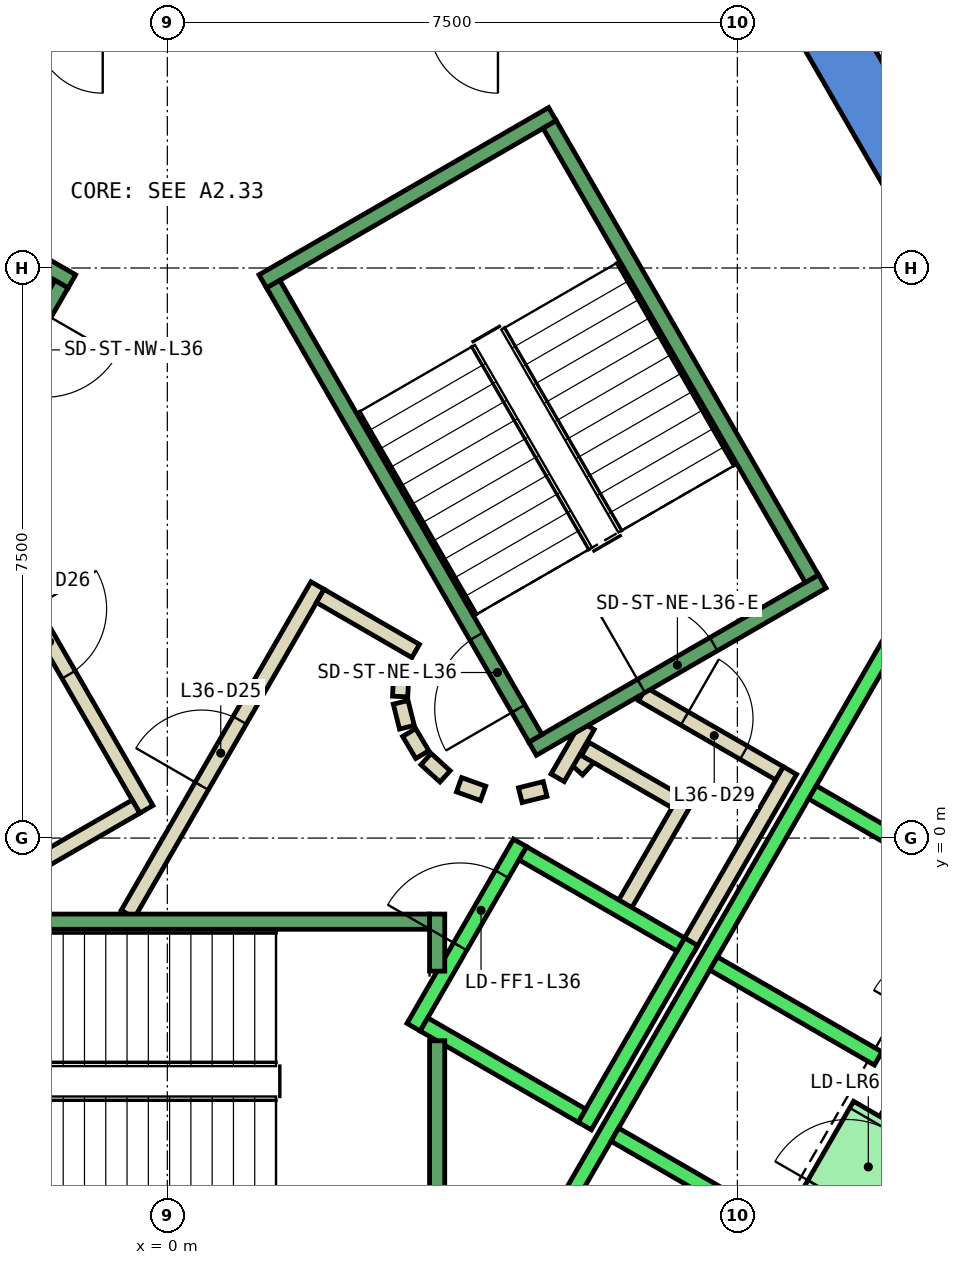
"""IFC4 building model, lengths in metres.
Left out: names, types, materials, properties, quantities, classifications, styles, units other than length and angle.
Written with IfcOpenShell. Run it as: python <this file> out.ifc"""

import sys

from ifc_helpers import new_model, si_unit, direction, frame, frame_2d, origin, place, context, subcontext, project, spatial, polyline, rectangle, outline, extrude, element, fill, save


model = new_model("IFC4")
c1 = context("Model", 3, precision=1e-05, world=origin(), true_north=direction((0.0, 1.0)))
c2 = subcontext(c1, "Body", "Model", "MODEL_VIEW")
j1 = project(units=[si_unit("LENGTHUNIT", "METRE"), si_unit("PLANEANGLEUNIT", "RADIAN")], contexts=[c1])
p1 = place(None, origin())
s1 = spatial("IfcSite", under=j1, at=p1, CompositionType="ELEMENT")
p2 = place(p1, origin())
s2 = spatial("IfcBuilding", under=s1, at=p2, CompositionType="ELEMENT")
p3 = place(p2, frame((0.0, 0.0, 163.4)))
s3 = spatial("IfcBuildingStorey", under=s2, at=p3, CompositionType="ELEMENT", Elevation=163.4)
p4 = place(p3, frame((0.0, 0.0, -0.4)))
e1 = element("IfcWall", 1, at=p4, inside=s3, PredefinedType="SHEAR", context=c2, shape_type="SweptSolid", body=[
    extrude(outline(polyline([(8.517, 11.748), (7.824, 11.348), (12.933, 2.5), (13.856, 2.5), (8.517, 11.748)])), origin(), (0.0, 0.0, 1.0), 4.2),
])
p5 = place(p3, frame((0.0, 0.0, -0.4)))
e2 = element("IfcWall", 2, at=p5, inside=s3, PredefinedType="SHEAR", context=c2, shape_type="SweptSolid", body=[
    extrude(outline(polyline([(10.717, -2.937), (10.025, -2.537), (9.374, -3.663), (10.067, -4.063), (10.717, -2.937)])), origin(), (0.0, 0.0, 1.0), 4.2),
])
p6 = place(p3, frame((0.0, 0.0, 3.6)))
e3 = element("IfcWall", 3, at=p6, inside=s3, PredefinedType="SHEAR", context=c2, shape_type="SweptSolid", body=[
    extrude(outline(polyline([(10.067, -4.063), (9.374, -3.663), (8.724, -4.789), (9.417, -5.189), (10.067, -4.063)])), origin(), (0.0, 0.0, 1.0), 0.2),
])
p7 = place(p3, frame((5.39, 0.898, 0.0), z_axis=(0.0, 0.0, 1.0), x_axis=(0.673828488714, 0.738887791073, 0.0)))
e4 = element("IfcWall", 4, at=p7, inside=s3, PredefinedType="PARTITIONING", context=c2, shape_type="SweptSolid", body=[
    extrude(rectangle(XDim=0.263, YDim=0.2, at=frame_2d((0.131, 0.0))), origin(), (0.0, 0.0, 1.0), 3.8),
])
p8 = place(p3, frame((5.499, 1.172, 0.0), z_axis=(0.0, 0.0, 1.0), x_axis=(0.866333505267, -0.499465972466, 0.0)))
e5 = element("IfcWall", 5, at=p8, inside=s3, PredefinedType="PARTITIONING", context=c2, shape_type="SweptSolid", body=[
    extrude(rectangle(XDim=1.374, YDim=0.2, at=frame_2d((0.687, 0.0))), origin(), (0.0, 0.0, 1.0), 3.8),
])
p9 = place(p3, frame((6.826, 0.522, 0.0), z_axis=(0.0, 0.0, 1.0), x_axis=(-0.500016722714, -0.866015748706, 0.0)))
e6 = element("IfcWall", 6, at=p9, inside=s3, PredefinedType="PARTITIONING", context=c2, shape_type="SweptSolid", body=[
    extrude(rectangle(XDim=1.7, YDim=0.2, at=frame_2d((0.85, 0.0))), origin(), (0.0, 0.0, 1.0), 3.8),
])
p10 = place(p3, frame((6.25, 1.894, 0.0), z_axis=(0.0, 0.0, 1.0), x_axis=(0.866043184279, -0.499969202016, 0.0)))
e7 = element("IfcWall", 7, at=p10, inside=s3, PredefinedType="PARTITIONING", context=c2, shape_type="SweptSolid", body=[
    extrude(rectangle(XDim=2.084, YDim=0.2, at=frame_2d((1.042, 0.0))), origin(), (0.0, 0.0, 1.0), 3.8),
])
p11 = place(p10, frame((0.642, 0.0, 0.0)))
e8 = element("IfcOpeningElement", 8, at=p11, cuts=e7, PredefinedType="OPENING", context=c2, shape_type="SweptSolid", body=[
    extrude(rectangle(XDim=0.9, YDim=2.1, at=frame_2d((0.45, 1.05))), frame((0.0, 0.11, 0.0), z_axis=(0.0, -1.0, 0.0), x_axis=(1.0, 0.0, 0.0)), (0.0, 0.0, 1.0), 0.22),
])
p12 = place(p3, frame((8.192, 0.888, 0.0), z_axis=(0.0, 0.0, 1.0), x_axis=(-0.499940625693, -0.866059680843, 0.0)))
e9 = element("IfcWall", 9, at=p12, inside=s3, PredefinedType="PARTITIONING", context=c2, shape_type="SweptSolid", body=[
    extrude(rectangle(XDim=2.68, YDim=0.2, at=frame_2d((1.34, 0.0))), origin(), (0.0, 0.0, 1.0), 3.8),
])
p13 = place(p3, frame((5.135, 0.793, 0.0), z_axis=(0.0, 0.0, 1.0), x_axis=(0.499526442893, 0.866298639529, 0.0)))
e10 = element("IfcWall", 10, at=p13, inside=s3, PredefinedType="PARTITIONING", context=c2, shape_type="SweptSolid", body=[
    extrude(rectangle(XDim=0.791, YDim=0.2, at=frame_2d((0.396, 0.0))), origin(), (0.0, 0.0, 1.0), 3.8),
])
p14 = place(p3, frame((-0.52, -1.0, 0.0), z_axis=(0.0, 0.0, 1.0), x_axis=(0.50011622646, 0.865958290007, 0.0)))
e11 = element("IfcWall", 11, at=p14, inside=s3, PredefinedType="PARTITIONING", context=c2, shape_type="SweptSolid", body=[
    extrude(rectangle(XDim=4.991, YDim=0.2, at=frame_2d((2.496, 0.0))), origin(), (0.0, 0.0, 1.0), 3.8),
])
p15 = place(p14, frame((1.945, 0.0, 0.0)))
e12 = element("IfcOpeningElement", 12, at=p15, cuts=e11, PredefinedType="OPENING", context=c2, shape_type="SweptSolid", body=[
    extrude(rectangle(XDim=1.0, YDim=2.1, at=frame_2d((0.5, 1.05))), frame((0.0, 0.11, 0.0), z_axis=(0.0, -1.0, 0.0), x_axis=(1.0, 0.0, 0.0)), (0.0, 0.0, 1.0), 0.22),
])
p16 = place(p3, frame((2.012, 3.186, 0.0), z_axis=(0.0, 0.0, 1.0), x_axis=(0.865891012941, -0.500232699559, 0.0)))
e13 = element("IfcWall", 13, at=p16, inside=s3, PredefinedType="PARTITIONING", context=c2, shape_type="SweptSolid", body=[
    extrude(rectangle(XDim=1.449, YDim=0.2, at=frame_2d((0.725, 0.0))), origin(), (0.0, 0.0, 1.0), 3.8),
])
p17 = place(p3, frame((3.079, 2.199, 0.0), z_axis=(0.0, 0.0, 1.0), x_axis=(-0.047771483479, -0.998858290933, 0.0)))
e14 = element("IfcWall", 14, at=p17, inside=s3, PredefinedType="PARTITIONING", context=c2, shape_type="SweptSolid", body=[
    extrude(rectangle(XDim=0.337, YDim=0.2, at=frame_2d((0.169, 0.0))), origin(), (0.0, 0.0, 1.0), 3.8),
])
p18 = place(p3, frame((3.07, 1.786, 0.0), z_axis=(0.0, 0.0, 1.0), x_axis=(0.242705583207, -0.970099994784, 0.0)))
e15 = element("IfcWall", 15, at=p18, inside=s3, PredefinedType="PARTITIONING", context=c2, shape_type="SweptSolid", body=[
    extrude(rectangle(XDim=0.338, YDim=0.2, at=frame_2d((0.169, 0.0))), origin(), (0.0, 0.0, 1.0), 3.8),
])
for number, where, z_axis, x_axis in (
    (16, (3.182, 1.388, 0.0), (0.0, 0.0, 1.0), (0.512, -0.859, 0.0)),
    (17, (3.404, 1.039, 0.0), (0.0, 0.0, 1.0), (0.74, -0.672, 0.0)),
):
    element("IfcWall", number, at=place(p3, frame(where, z_axis=z_axis, x_axis=x_axis)), inside=s3, PredefinedType="PARTITIONING", context=c2, shape_type="SweptSolid", body=[
        extrude(rectangle(XDim=0.338, YDim=0.2, at=frame_2d((0.169, 0.0))), origin(), (0.0, 0.0, 1.0), 3.8),
    ])
p19 = place(p3, frame((3.838, 0.702, 0.0), z_axis=(0.0, 0.0, 1.0), x_axis=(0.941035081519, -0.338308993895, 0.0)))
e18 = element("IfcWall", 18, at=p19, inside=s3, PredefinedType="PARTITIONING", context=c2, shape_type="SweptSolid", body=[
    extrude(rectangle(XDim=0.337, YDim=0.2, at=frame_2d((0.168, 0.0))), origin(), (0.0, 0.0, 1.0), 3.8),
])
p20 = place(p3, frame((4.644, 0.564, 0.0), z_axis=(0.0, 0.0, 1.0), x_axis=(0.969929076366, 0.243387729394, 0.0)))
e19 = element("IfcWall", 19, at=p20, inside=s3, PredefinedType="PARTITIONING", context=c2, shape_type="SweptSolid", body=[
    extrude(rectangle(XDim=0.337, YDim=0.2, at=frame_2d((0.168, 0.0))), origin(), (0.0, 0.0, 1.0), 3.8),
])
p21 = place(p3, frame((-2.771, 4.7, 0.0), z_axis=(0.0, 0.0, 1.0), x_axis=(0.499969479948, -0.866043023828, 0.0)))
e20 = element("IfcWall", 20, at=p21, inside=s3, PredefinedType="PARTITIONING", context=c2, shape_type="SweptSolid", body=[
    extrude(rectangle(XDim=4.99, YDim=0.2, at=frame_2d((2.495, 0.0))), origin(), (0.0, 0.0, 1.0), 3.8),
])
p22 = place(p21, frame((1.945, 0.0, 0.0)))
e21 = element("IfcOpeningElement", 21, at=p22, cuts=e20, PredefinedType="OPENING", context=c2, shape_type="SweptSolid", body=[
    extrude(rectangle(XDim=1.0, YDim=2.1, at=frame_2d((0.5, 1.05))), frame((0.0, 0.11, 0.0), z_axis=(0.0, -1.0, 0.0), x_axis=(1.0, 0.0, 0.0)), (0.0, 0.0, 1.0), 0.22),
])
p23 = place(p3, frame((-0.412, 0.414, 0.0), z_axis=(0.0, 0.0, 1.0), x_axis=(-0.866017369001, -0.500013916395, 0.0)))
e22 = element("IfcWall", 22, at=p23, inside=s3, PredefinedType="PARTITIONING", context=c2, shape_type="SweptSolid", body=[
    extrude(rectangle(XDim=1.45, YDim=0.2, at=frame_2d((0.725, 0.0))), origin(), (0.0, 0.0, 1.0), 3.8),
])
p24 = place(p3, frame((3.24, -2.488, 0.0), z_axis=(0.0, 0.0, 1.0), x_axis=(0.49994636267, 0.866056369097, 0.0)))
e23 = element("IfcWall", 23, at=p24, inside=s3, PredefinedType="STANDARD", context=c2, shape_type="SweptSolid", body=[
    extrude(rectangle(XDim=2.8, YDim=0.2, at=frame_2d((1.4, 0.0))), origin(), (0.0, 0.0, 1.0), 3.8),
])
p25 = place(p24, frame((1.225, 0.0, 0.0)))
e24 = element("IfcOpeningElement", 24, at=p25, cuts=e23, PredefinedType="OPENING", context=c2, shape_type="SweptSolid", body=[
    extrude(rectangle(XDim=1.1, YDim=2.1, at=frame_2d((0.55, 1.05))), frame((0.0, 0.11, 0.0), z_axis=(0.0, -1.0, 0.0), x_axis=(1.0, 0.0, 0.0)), (0.0, 0.0, 1.0), 0.22),
])
p26 = place(p3, frame((5.492, -3.788, 0.0), z_axis=(0.0, 0.0, 1.0), x_axis=(0.500011755427, 0.866018616679, 0.0)))
e25 = element("IfcWall", 25, at=p26, inside=s3, PredefinedType="STANDARD", context=c2, shape_type="SweptSolid", body=[
    extrude(rectangle(XDim=2.8, YDim=0.2, at=frame_2d((1.4, 0.0))), origin(), (0.0, 0.0, 1.0), 3.8),
])
p27 = place(p3, frame((3.377, -2.452, 0.0), z_axis=(0.0, 0.0, 1.0), x_axis=(0.865955154139, -0.50012165622, 0.0)))
e26 = element("IfcWall", 26, at=p27, inside=s3, PredefinedType="STANDARD", context=c2, shape_type="SweptSolid", body=[
    extrude(rectangle(XDim=2.4, YDim=0.2, at=frame_2d((1.2, 0.0))), origin(), (0.0, 0.0, 1.0), 3.8),
])
p28 = place(p3, frame((4.677, -0.2, 0.0), z_axis=(0.0, 0.0, 1.0), x_axis=(0.865973769406, -0.500089422704, 0.0)))
e27 = element("IfcWall", 27, at=p28, inside=s3, PredefinedType="STANDARD", context=c2, shape_type="SweptSolid", body=[
    extrude(rectangle(XDim=2.399, YDim=0.2, at=frame_2d((1.2, 0.0))), origin(), (0.0, 0.0, 1.0), 3.8),
])
p29 = place(p3, frame((4.451, -6.19, 0.0), z_axis=(0.0, 0.0, 1.0), x_axis=(0.50000090737, 0.866024879913, 0.0)))
e28 = element("IfcWall", 28, at=p29, inside=s3, PredefinedType="STANDARD", context=c2, shape_type="SweptSolid", body=[
    extrude(rectangle(XDim=10.6, YDim=0.2, at=frame_2d((5.3, 0.0))), origin(), (0.0, 0.0, 1.0), 3.8),
])
for number, where, z_axis, x_axis in (
    (29, (5.888, -3.902, 0.0), (0.0, 0.0, 1.0), (0.866, -0.5, 0.0)),
    (30, (7.188, -1.65, 0.0), (0.0, 0.0, 1.0), (0.866, -0.5, 0.0)),
    (31, (8.488, 0.602, 0.0), (0.0, 0.0, 1.0), (0.866, -0.5, 0.0)),
):
    element("IfcWall", number, at=place(p3, frame(where, z_axis=z_axis, x_axis=x_axis)), inside=s3, PredefinedType="STANDARD", context=c2, shape_type="SweptSolid", body=[
        extrude(rectangle(XDim=2.5, YDim=0.2, at=frame_2d((1.25, 0.0))), origin(), (0.0, 0.0, 1.0), 3.8),
    ])
p30 = place(p3, frame((8.898, -4.889, 0.0), z_axis=(0.0, 0.0, 1.0), x_axis=(0.500036693733, 0.866004217611, 0.0)))
e32 = element("IfcWall", 32, at=p30, inside=s3, PredefinedType="STANDARD", context=c2, shape_type="SweptSolid", body=[
    extrude(rectangle(XDim=1.3, YDim=1.2, at=frame_2d((0.65, 0.0))), origin(), (0.0, 0.0, 1.0), 2.4),
])
p31 = place(p30, frame((0.1, 0.0, 0.0)))
e33 = element("IfcOpeningElement", 33, at=p31, cuts=e32, PredefinedType="OPENING", context=c2, shape_type="SweptSolid", body=[
    extrude(rectangle(XDim=1.1, YDim=2.3, at=frame_2d((0.55, 1.15))), frame((0.0, 0.61, 0.0), z_axis=(0.0, -1.0, 0.0), x_axis=(1.0, 0.0, 0.0)), (0.0, 0.0, 1.0), 1.22),
])
p32 = place(p3, frame((3.55, -2.667, 0.0), z_axis=(0.0, 0.0, 1.0), x_axis=(0.0, -1.0, 0.0)))
e34 = element("IfcWall", 34, at=p32, inside=s3, PredefinedType="STANDARD", context=c2, shape_type="SweptSolid", body=[
    extrude(rectangle(XDim=2.733, YDim=0.2, at=frame_2d((1.366, 0.0))), origin(), (0.0, 0.0, 1.0), 3.8),
])
p33 = place(p3, frame((3.55, -1.0, 0.0), z_axis=(0.0, 0.0, 1.0), x_axis=(0.0, -1.0, 0.0)))
e35 = element("IfcWall", 35, at=p33, inside=s3, PredefinedType="STANDARD", context=c2, shape_type="SweptSolid", body=[
    extrude(rectangle(XDim=0.751, YDim=0.2, at=frame_2d((0.375, 0.0))), origin(), (0.0, 0.0, 1.0), 3.8),
])
p34 = place(p3, frame((-3.45, -1.1, 0.0), z_axis=(0.0, 0.0, 1.0), x_axis=(1.0, 0.0, 0.0)))
e36 = element("IfcWall", 36, at=p34, inside=s3, PredefinedType="STANDARD", context=c2, shape_type="SweptSolid", body=[
    extrude(rectangle(XDim=6.9, YDim=0.2, at=frame_2d((3.45, 0.0))), origin(), (0.0, 0.0, 1.0), 3.8),
])
p35 = place(p34, frame((0.45, 0.0, 0.0)))
e37 = element("IfcOpeningElement", 37, at=p35, cuts=e36, PredefinedType="OPENING", context=c2, shape_type="SweptSolid", body=[
    extrude(rectangle(XDim=1.1, YDim=2.2, at=frame_2d((0.55, 1.1))), frame((0.0, 0.11, 0.0), z_axis=(0.0, -1.0, 0.0), x_axis=(1.0, 0.0, 0.0)), (0.0, 0.0, 1.0), 0.22),
])
p36 = place(p3, frame((4.806, 1.176, 0.0), z_axis=(0.0, 0.0, 1.0), x_axis=(0.866059941101, 0.499940174841, 0.0)))
e38 = element("IfcWall", 38, at=p36, inside=s3, PredefinedType="STANDARD", context=c2, shape_type="SweptSolid", body=[
    extrude(rectangle(XDim=4.4, YDim=0.2, at=frame_2d((2.2, 0.0))), origin(), (0.0, 0.0, 1.0), 3.8),
])
p37 = place(p36, frame((1.65, 0.0, 0.0)))
e39 = element("IfcOpeningElement", 39, at=p37, cuts=e38, PredefinedType="OPENING", context=c2, shape_type="SweptSolid", body=[
    extrude(rectangle(XDim=1.1, YDim=2.2, at=frame_2d((0.55, 1.1))), frame((0.0, 0.11, 0.0), z_axis=(0.0, -1.0, 0.0), x_axis=(1.0, 0.0, 0.0)), (0.0, 0.0, 1.0), 0.22),
])
p38 = place(p3, frame((1.256, 7.324, 0.0), z_axis=(0.0, 0.0, 1.0), x_axis=(0.866046073146, 0.499964197906, 0.0)))
e40 = element("IfcWall", 40, at=p38, inside=s3, PredefinedType="STANDARD", context=c2, shape_type="SweptSolid", body=[
    extrude(rectangle(XDim=4.4, YDim=0.2, at=frame_2d((2.2, 0.0))), origin(), (0.0, 0.0, 1.0), 3.8),
])
p39 = place(p3, frame((4.843, 1.312, 0.0), z_axis=(0.0, 0.0, 1.0), x_axis=(-0.499963383562, 0.866046543262, 0.0)))
e41 = element("IfcWall", 41, at=p39, inside=s3, PredefinedType="STANDARD", context=c2, shape_type="SweptSolid", body=[
    extrude(rectangle(XDim=6.9, YDim=0.2, at=frame_2d((3.45, 0.0))), origin(), (0.0, 0.0, 1.0), 3.8),
])
p40 = place(p39, frame((0.45, 0.0, 0.0)))
e42 = element("IfcOpeningElement", 42, at=p40, cuts=e41, PredefinedType="OPENING", context=c2, shape_type="SweptSolid", body=[
    extrude(rectangle(XDim=1.1, YDim=2.2, at=frame_2d((0.55, 1.1))), frame((0.0, 0.11, 0.0), z_axis=(0.0, -1.0, 0.0), x_axis=(1.0, 0.0, 0.0)), (0.0, 0.0, 1.0), 0.22),
])
p41 = place(p3, frame((8.48, 3.412, 0.0), z_axis=(0.0, 0.0, 1.0), x_axis=(-0.499978703459, 0.866037698999, 0.0)))
e43 = element("IfcWall", 43, at=p41, inside=s3, PredefinedType="STANDARD", context=c2, shape_type="SweptSolid", body=[
    extrude(rectangle(XDim=6.9, YDim=0.2, at=frame_2d((3.45, 0.0))), origin(), (0.0, 0.0, 1.0), 3.8),
])
p42 = place(p3, frame((-1.256, 7.324, 0.0), z_axis=(0.0, 0.0, 1.0), x_axis=(-0.866046073146, 0.499964197906, 0.0)))
e44 = element("IfcWall", 44, at=p42, inside=s3, PredefinedType="STANDARD", context=c2, shape_type="SweptSolid", body=[
    extrude(rectangle(XDim=4.4, YDim=0.2, at=frame_2d((2.2, 0.0))), origin(), (0.0, 0.0, 1.0), 3.8),
])
p43 = place(p42, frame((1.65, 0.0, 0.0)))
e45 = element("IfcOpeningElement", 45, at=p43, cuts=e44, PredefinedType="OPENING", context=c2, shape_type="SweptSolid", body=[
    extrude(rectangle(XDim=1.1, YDim=2.2, at=frame_2d((0.55, 1.1))), frame((0.0, 0.11, 0.0), z_axis=(0.0, -1.0, 0.0), x_axis=(1.0, 0.0, 0.0)), (0.0, 0.0, 1.0), 0.22),
])
p44 = place(p3, frame((-1.393, 7.288, 0.0), z_axis=(0.0, 0.0, 1.0), x_axis=(-0.499963383562, -0.866046543262, 0.0)))
e46 = element("IfcWall", 46, at=p44, inside=s3, PredefinedType="STANDARD", context=c2, shape_type="SweptSolid", body=[
    extrude(rectangle(XDim=6.9, YDim=0.2, at=frame_2d((3.45, 0.0))), origin(), (0.0, 0.0, 1.0), 3.8),
])
p45 = place(p44, frame((0.45, 0.0, 0.0)))
e47 = element("IfcOpeningElement", 47, at=p45, cuts=e46, PredefinedType="OPENING", context=c2, shape_type="SweptSolid", body=[
    extrude(rectangle(XDim=1.1, YDim=2.2, at=frame_2d((0.55, 1.1))), frame((0.0, 0.11, 0.0), z_axis=(0.0, -1.0, 0.0), x_axis=(1.0, 0.0, 0.0)), (0.0, 0.0, 1.0), 0.22),
])
p46 = place(p15, origin())
e48 = element("IfcDoor", 48, at=p46, inside=s3, OperationType="SINGLE_SWING_LEFT", PredefinedType="DOOR", context=c2, shape_type="SweptSolid", body=[
    extrude(rectangle(XDim=1.0, YDim=2.1, at=frame_2d((0.5, 1.05))), frame((0.0, 0.025, 0.0), z_axis=(0.0, -1.0, 0.0), x_axis=(1.0, 0.0, 0.0)), (0.0, 0.0, 1.0), 0.05),
])
fill(e12, e48)
p47 = place(p22, origin())
e49 = element("IfcDoor", 49, at=p47, inside=s3, OperationType="SINGLE_SWING_RIGHT", PredefinedType="DOOR", context=c2, shape_type="SweptSolid", body=[
    extrude(rectangle(XDim=1.0, YDim=2.1, at=frame_2d((0.5, 1.05))), frame((0.0, 0.025, 0.0), z_axis=(0.0, -1.0, 0.0), x_axis=(1.0, 0.0, 0.0)), (0.0, 0.0, 1.0), 0.05),
])
fill(e21, e49)
p48 = place(p11, origin())
e50 = element("IfcDoor", 50, at=p48, inside=s3, OperationType="SINGLE_SWING_LEFT", PredefinedType="DOOR", context=c2, shape_type="SweptSolid", body=[
    extrude(rectangle(XDim=0.9, YDim=2.1, at=frame_2d((0.45, 1.05))), frame((0.0, 0.025, 0.0), z_axis=(0.0, -1.0, 0.0), x_axis=(1.0, 0.0, 0.0)), (0.0, 0.0, 1.0), 0.05),
])
fill(e8, e50)
p49 = place(p31, origin())
e51 = element("IfcDoor", 51, at=p49, inside=s3, OperationType="SLIDING_TO_LEFT", PredefinedType="DOOR", context=c2, shape_type="SweptSolid", body=[
    extrude(rectangle(XDim=1.1, YDim=2.3, at=frame_2d((0.55, 1.15))), frame((0.0, 0.025, 0.0), z_axis=(0.0, -1.0, 0.0), x_axis=(1.0, 0.0, 0.0)), (0.0, 0.0, 1.0), 0.05),
])
fill(e33, e51)
p50 = place(p25, origin())
e52 = element("IfcDoor", 52, at=p50, inside=s3, OperationType="SLIDING_TO_LEFT", PredefinedType="DOOR", context=c2, shape_type="SweptSolid", body=[
    extrude(rectangle(XDim=1.1, YDim=2.1, at=frame_2d((0.55, 1.05))), frame((0.0, 0.025, 0.0), z_axis=(0.0, -1.0, 0.0), x_axis=(1.0, 0.0, 0.0)), (0.0, 0.0, 1.0), 0.05),
])
fill(e24, e52)
p51 = place(p40, origin())
e53 = element("IfcDoor", 53, at=p51, inside=s3, OperationType="SINGLE_SWING_LEFT", PredefinedType="DOOR", context=c2, shape_type="SweptSolid", body=[
    extrude(rectangle(XDim=1.1, YDim=2.2, at=frame_2d((0.55, 1.1))), frame((0.0, 0.025, 0.0), z_axis=(0.0, -1.0, 0.0), x_axis=(1.0, 0.0, 0.0)), (0.0, 0.0, 1.0), 0.05),
])
fill(e42, e53)
p52 = place(p37, origin())
e54 = element("IfcDoor", 54, at=p52, inside=s3, OperationType="SINGLE_SWING_LEFT", PredefinedType="DOOR", context=c2, shape_type="SweptSolid", body=[
    extrude(rectangle(XDim=1.1, YDim=2.2, at=frame_2d((0.55, 1.1))), frame((0.0, 0.025, 0.0), z_axis=(0.0, -1.0, 0.0), x_axis=(1.0, 0.0, 0.0)), (0.0, 0.0, 1.0), 0.05),
])
fill(e39, e54)
save(model, sys.argv[1])
